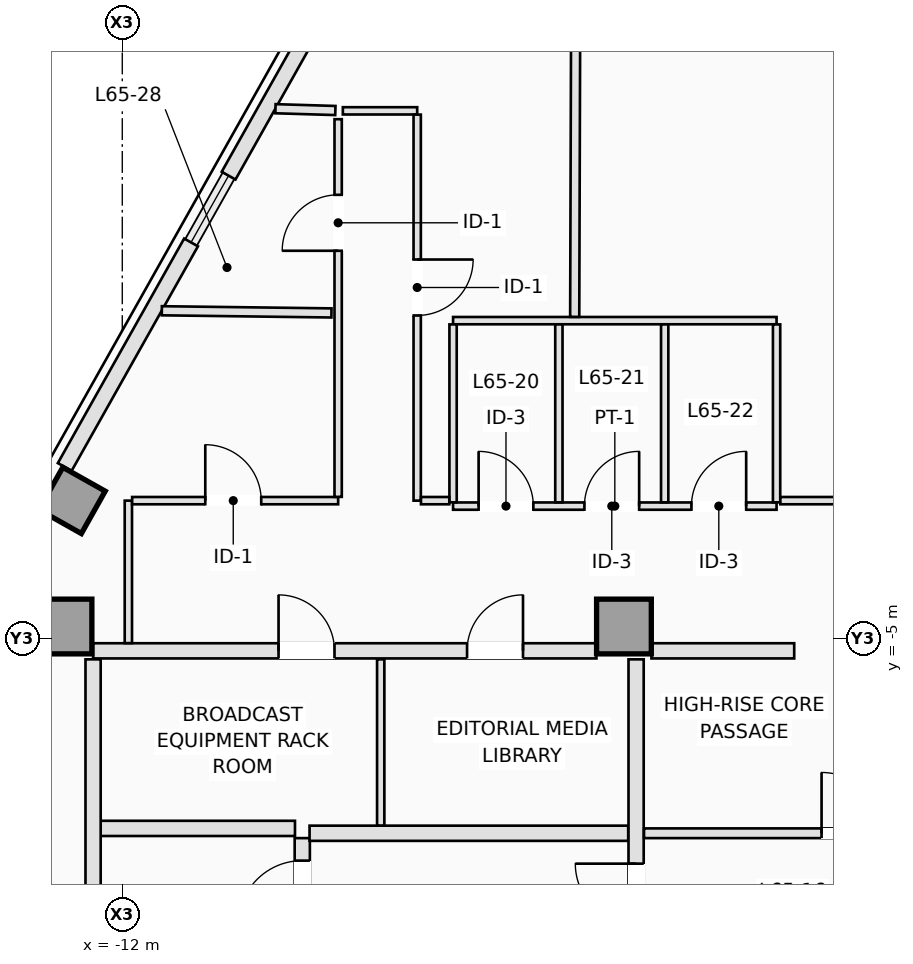
"""IFC4 building model, lengths in metres.
Left out: names, types, materials, properties, quantities, classifications, styles, units other than length and angle.
Written with IfcOpenShell. Run it as: python <this file> out.ifc"""

import sys

from ifc_helpers import new_model, si_unit, direction, frame, frame_2d, origin, origin_2d, place, context, subcontext, project, spatial, rectangle, extrude, element, fill, save


model = new_model("IFC4")
c1 = context("Model", 3, precision=1e-05, world=origin(), true_north=direction((0.0, 1.0)))
c2 = subcontext(c1, "Body", "Model", "MODEL_VIEW")
j1 = project(units=[si_unit("LENGTHUNIT", "METRE"), si_unit("PLANEANGLEUNIT", "RADIAN")], contexts=[c1])
p1 = place(None, origin())
s1 = spatial("IfcSite", under=j1, at=p1, CompositionType="ELEMENT")
p2 = place(p1, origin())
s2 = spatial("IfcBuilding", under=s1, at=p2, CompositionType="ELEMENT")
p3 = place(p2, frame((0.0, 0.0, 235.9)))
s3 = spatial("IfcBuildingStorey", under=s2, at=p3, CompositionType="ELEMENT", Elevation=235.9)
for number, where, z_axis, x_axis in (
    (1, (-12.95, -4.8, 0.0), (0.0, 0.0, 1.0), (1.0, 0.0, 0.0)),
    (2, (-3.75, -4.8, 0.0), (0.0, 0.0, 1.0), (1.0, 0.0, 0.0)),
):
    element("IfcColumn", number, at=place(p3, frame(where, z_axis=z_axis, x_axis=x_axis)), inside=s3, PredefinedType="COLUMN", context=c2, shape_type="SweptSolid", body=[
        extrude(rectangle(XDim=0.9, YDim=0.9, at=origin_2d()), origin(), (0.0, 0.0, 1.0), 3.5),
    ])
p4 = place(p3, frame((-12.825, -2.727, 0.0), z_axis=(0.0, 0.0, 1.0), x_axis=(-0.871575139605, 0.490261946333, 0.0)))
e3 = element("IfcColumn", 3, at=p4, inside=s3, PredefinedType="COLUMN", context=c2, shape_type="SweptSolid", body=[
    extrude(rectangle(XDim=0.8, YDim=0.8, at=origin_2d()), origin(), (0.0, 0.0, 1.0), 3.5),
])
p5 = place(p3, frame((-12.946, -2.177, 0.0), z_axis=(0.0, 0.0, 1.0), x_axis=(0.490244825075, 0.871584770109, 0.0)))
e4 = element("IfcWall", 4, at=p5, inside=s3, PredefinedType="STANDARD", context=c2, shape_type="SweptSolid", body=[
    extrude(rectangle(XDim=4.237, YDim=0.26, at=frame_2d((2.119, 0.0))), origin(), (0.0, 0.0, 1.0), 3.25),
])
p6 = place(p3, frame((-10.251, 2.615, 0.0), z_axis=(0.0, 0.0, 1.0), x_axis=(0.490269447258, 0.871570920284, 0.0)))
e5 = element("IfcWall", 5, at=p6, inside=s3, PredefinedType="STANDARD", context=c2, shape_type="SweptSolid", body=[
    extrude(rectangle(XDim=4.237, YDim=0.26, at=frame_2d((2.118, 0.0))), origin(), (0.0, 0.0, 1.0), 3.25),
])
p7 = place(p3, frame((-9.04, -10.18, 0.0), z_axis=(0.0, 0.0, 1.0), x_axis=(0.0, 1.0, 0.0)))
e6 = element("IfcWall", 6, at=p7, inside=s3, PredefinedType="PARTITIONING", context=c2, shape_type="SweptSolid", body=[
    extrude(rectangle(XDim=1.9, YDim=0.25, at=frame_2d((0.95, 0.0))), origin(), (0.0, 0.0, 1.0), 3.25),
])
p8 = place(p7, frame((0.48, 0.0, 0.0)))
e7 = element("IfcOpeningElement", 7, at=p8, cuts=e6, PredefinedType="OPENING", context=c2, shape_type="SweptSolid", body=[
    extrude(rectangle(XDim=1.05, YDim=2.15, at=frame_2d((0.525, 1.075))), frame((0.0, 0.135, 0.0), z_axis=(0.0, -1.0, 0.0), x_axis=(1.0, 0.0, 0.0)), (0.0, 0.0, 1.0), 0.27),
])
p9 = place(p3, frame((-12.38, -8.12, 0.0), z_axis=(0.0, 0.0, 1.0), x_axis=(1.0, 0.0, 0.0)))
e8 = element("IfcWall", 8, at=p9, inside=s3, PredefinedType="PARTITIONING", context=c2, shape_type="SweptSolid", body=[
    extrude(rectangle(XDim=3.22, YDim=0.25, at=frame_2d((1.61, 0.0))), origin(), (0.0, 0.0, 1.0), 3.25),
])
p10 = place(p3, frame((-12.48, -10.18, 0.0), z_axis=(0.0, 0.0, 1.0), x_axis=(0.0, 1.0, 0.0)))
e9 = element("IfcWall", 9, at=p10, inside=s3, PredefinedType="PARTITIONING", context=c2, shape_type="SweptSolid", body=[
    extrude(rectangle(XDim=4.84, YDim=0.25, at=frame_2d((2.42, 0.0))), origin(), (0.0, 0.0, 1.0), 3.25),
])
p11 = place(p3, frame((-8.92, -8.2, 0.0), z_axis=(0.0, 0.0, 1.0), x_axis=(1.0, 0.0, 0.0)))
e10 = element("IfcWall", 10, at=p11, inside=s3, PredefinedType="PARTITIONING", context=c2, shape_type="SweptSolid", body=[
    extrude(rectangle(XDim=5.24, YDim=0.25, at=frame_2d((2.62, 0.0))), origin(), (0.0, 0.0, 1.0), 3.25),
])
p12 = place(p3, frame((-3.55, -15.898, 0.0), z_axis=(0.0, 0.0, 1.0), x_axis=(0.0, 1.0, 0.0)))
e11 = element("IfcWall", 11, at=p12, inside=s3, PredefinedType="PARTITIONING", context=c2, shape_type="SweptSolid", body=[
    extrude(rectangle(XDim=10.558, YDim=0.25, at=frame_2d((5.279, 0.0))), origin(), (0.0, 0.0, 1.0), 3.25),
])
p13 = place(p12, frame((6.198, 0.0, 0.0)))
e12 = element("IfcOpeningElement", 12, at=p13, cuts=e11, PredefinedType="OPENING", context=c2, shape_type="SweptSolid", body=[
    extrude(rectangle(XDim=1.0, YDim=2.15, at=frame_2d((0.5, 1.075))), frame((0.0, 0.135, 0.0), z_axis=(0.0, -1.0, 0.0), x_axis=(1.0, 0.0, 0.0)), (0.0, 0.0, 1.0), 0.27),
])
p14 = place(p3, frame((-12.48, -5.2, 0.0), z_axis=(0.0, 0.0, 1.0), x_axis=(1.0, 0.0, 0.0)))
e13 = element("IfcWall", 13, at=p14, inside=s3, PredefinedType="PARTITIONING", context=c2, shape_type="SweptSolid", body=[
    extrude(rectangle(XDim=8.278, YDim=0.25, at=frame_2d((4.139, 0.0))), origin(), (0.0, 0.0, 1.0), 3.25),
])
p15 = place(p14, frame((3.05, 0.0, 0.0)))
e14 = element("IfcOpeningElement", 14, at=p15, cuts=e13, PredefinedType="OPENING", context=c2, shape_type="SweptSolid", body=[
    extrude(rectangle(XDim=0.92, YDim=2.12, at=frame_2d((0.46, 1.06))), frame((0.0, 0.135, 0.0), z_axis=(0.0, -1.0, 0.0), x_axis=(1.0, 0.0, 0.0)), (0.0, 0.0, 1.0), 0.27),
])
p16 = place(p14, frame((6.15, 0.0, 0.0)))
e15 = element("IfcOpeningElement", 15, at=p16, cuts=e13, PredefinedType="OPENING", context=c2, shape_type="SweptSolid", body=[
    extrude(rectangle(XDim=0.92, YDim=2.12, at=frame_2d((0.46, 1.06))), frame((0.0, 0.135, 0.0), z_axis=(0.0, -1.0, 0.0), x_axis=(1.0, 0.0, 0.0)), (0.0, 0.0, 1.0), 0.27),
])
p17 = place(p3, frame((-3.298, -5.2, 0.0), z_axis=(0.0, 0.0, 1.0), x_axis=(1.0, 0.0, 0.0)))
e16 = element("IfcWall", 16, at=p17, inside=s3, PredefinedType="PARTITIONING", context=c2, shape_type="SweptSolid", body=[
    extrude(rectangle(XDim=2.348, YDim=0.25, at=frame_2d((1.174, 0.0))), origin(), (0.0, 0.0, 1.0), 3.25),
])
p18 = place(p3, frame((-7.75, -8.073, 0.0), z_axis=(0.0, 0.0, 1.0), x_axis=(0.0, 1.0, 0.0)))
e17 = element("IfcWall", 17, at=p18, inside=s3, PredefinedType="PARTITIONING", context=c2, shape_type="SweptSolid", body=[
    extrude(rectangle(XDim=2.733, YDim=0.12, at=frame_2d((1.366, 0.0))), origin(), (0.0, 0.0, 1.0), 3.25),
])
p19 = place(p3, frame((-3.42, -8.2, 0.0), z_axis=(0.0, 0.0, 1.0), x_axis=(1.0, 0.0, 0.0)))
e18 = element("IfcWall", 18, at=p19, inside=s3, PredefinedType="PARTITIONING", context=c2, shape_type="SweptSolid", body=[
    extrude(rectangle(XDim=6.84, YDim=0.16, at=frame_2d((3.42, 0.0))), origin(), (0.0, 0.0, 1.0), 3.25),
])
p20 = place(p19, frame((2.92, 0.0, 0.0)))
e19 = element("IfcOpeningElement", 19, at=p20, cuts=e18, PredefinedType="OPENING", context=c2, shape_type="SweptSolid", body=[
    extrude(rectangle(XDim=1.0, YDim=2.15, at=frame_2d((0.5, 1.075))), frame((0.0, 0.09, 0.0), z_axis=(0.0, -1.0, 0.0), x_axis=(1.0, 0.0, 0.0)), (0.0, 0.0, 1.0), 0.18),
])
p21 = place(p3, frame((-6.56, -2.82, 0.0), z_axis=(0.0, 0.0, 1.0), x_axis=(1.0, 0.0, 0.0)))
e20 = element("IfcWall", 20, at=p21, inside=s3, PredefinedType="PARTITIONING", context=c2, shape_type="SweptSolid", body=[
    extrude(rectangle(XDim=5.32, YDim=0.12, at=frame_2d((2.66, 0.0))), origin(), (0.0, 0.0, 1.0), 2.943),
])
p22 = place(p21, frame((0.42, 0.0, 0.0)))
e21 = element("IfcOpeningElement", 21, at=p22, cuts=e20, PredefinedType="OPENING", context=c2, shape_type="SweptSolid", body=[
    extrude(rectangle(XDim=0.9, YDim=2.12, at=frame_2d((0.45, 1.06))), frame((0.0, 0.07, 0.0), z_axis=(0.0, -1.0, 0.0), x_axis=(1.0, 0.0, 0.0)), (0.0, 0.0, 1.0), 0.14),
])
p23 = place(p21, frame((2.16, 0.0, 0.0)))
e22 = element("IfcOpeningElement", 22, at=p23, cuts=e20, PredefinedType="OPENING", context=c2, shape_type="SweptSolid", body=[
    extrude(rectangle(XDim=0.9, YDim=2.12, at=frame_2d((0.45, 1.06))), frame((0.0, 0.07, 0.0), z_axis=(0.0, -1.0, 0.0), x_axis=(1.0, 0.0, 0.0)), (0.0, 0.0, 1.0), 0.14),
])
p24 = place(p21, frame((3.92, 0.0, 0.0)))
e23 = element("IfcOpeningElement", 23, at=p24, cuts=e20, PredefinedType="OPENING", context=c2, shape_type="SweptSolid", body=[
    extrude(rectangle(XDim=0.9, YDim=2.12, at=frame_2d((0.45, 1.06))), frame((0.0, 0.07, 0.0), z_axis=(0.0, -1.0, 0.0), x_axis=(1.0, 0.0, 0.0)), (0.0, 0.0, 1.0), 0.14),
])
p25 = place(p3, frame((-6.56, 0.23, 0.0), z_axis=(0.0, 0.0, 1.0), x_axis=(1.0, 0.0, 0.0)))
e24 = element("IfcWall", 24, at=p25, inside=s3, PredefinedType="PARTITIONING", context=c2, shape_type="SweptSolid", body=[
    extrude(rectangle(XDim=5.32, YDim=0.12, at=frame_2d((2.66, 0.0))), origin(), (0.0, 0.0, 1.0), 3.25),
])
for number, where, z_axis, x_axis in (
    (25, (-6.56, -2.758, 0.0), (0.0, 0.0, 1.0), (0.0, 1.0, 0.0)),
    (26, (-4.82, -2.758, 0.0), (0.0, 0.0, 1.0), (0.0, 1.0, 0.0)),
    (27, (-3.08, -2.758, 0.0), (0.0, 0.0, 1.0), (0.0, 1.0, 0.0)),
    (28, (-1.24, -2.758, 0.0), (0.0, 0.0, 1.0), (0.0, 1.0, 0.0)),
):
    element("IfcWall", number, at=place(p3, frame(where, z_axis=z_axis, x_axis=x_axis)), inside=s3, PredefinedType="PARTITIONING", context=c2, shape_type="SweptSolid", body=[
        extrude(rectangle(XDim=2.926, YDim=0.12, at=frame_2d((1.463, 0.0))), origin(), (0.0, 0.0, 1.0), 3.25),
    ])
p26 = place(p3, frame((-11.9, -5.073, 0.0), z_axis=(0.0, 0.0, 1.0), x_axis=(0.0, 1.0, 0.0)))
e29 = element("IfcWall", 29, at=p26, inside=s3, PredefinedType="PARTITIONING", context=c2, shape_type="SweptSolid", body=[
    extrude(rectangle(XDim=2.343, YDim=0.12, at=frame_2d((1.171, 0.0))), origin(), (0.0, 0.0, 1.0), 3.25),
])
p27 = place(p3, frame((-11.838, -2.73, 0.0), z_axis=(0.0, 0.0, 1.0), x_axis=(1.0, 0.0, 0.0)))
e30 = element("IfcWall", 30, at=p27, inside=s3, PredefinedType="PARTITIONING", context=c2, shape_type="SweptSolid", body=[
    extrude(rectangle(XDim=3.388, YDim=0.12, at=frame_2d((1.694, 0.0))), origin(), (0.0, 0.0, 1.0), 3.25),
])
p28 = place(p27, frame((1.203, 0.0, 0.0)))
e31 = element("IfcOpeningElement", 31, at=p28, cuts=e30, PredefinedType="OPENING", context=c2, shape_type="SweptSolid", body=[
    extrude(rectangle(XDim=0.92, YDim=2.12, at=frame_2d((0.46, 1.06))), frame((0.0, 0.07, 0.0), z_axis=(0.0, -1.0, 0.0), x_axis=(1.0, 0.0, 0.0)), (0.0, 0.0, 1.0), 0.14),
])
p29 = place(p3, frame((-8.45, -2.668, 0.0), z_axis=(0.0, 0.0, 1.0), x_axis=(0.0, 1.0, 0.0)))
e32 = element("IfcWall", 32, at=p29, inside=s3, PredefinedType="PARTITIONING", context=c2, shape_type="SweptSolid", body=[
    extrude(rectangle(XDim=6.21, YDim=0.12, at=frame_2d((3.105, 0.0))), origin(), (0.0, 0.0, 1.0), 3.25),
])
p30 = place(p29, frame((4.047, 0.0, 0.0)))
e33 = element("IfcOpeningElement", 33, at=p30, cuts=e32, PredefinedType="OPENING", context=c2, shape_type="SweptSolid", body=[
    extrude(rectangle(XDim=0.92, YDim=2.12, at=frame_2d((0.46, 1.06))), frame((0.0, 0.07, 0.0), z_axis=(0.0, -1.0, 0.0), x_axis=(1.0, 0.0, 0.0)), (0.0, 0.0, 1.0), 0.14),
])
p31 = place(p3, frame((-8.373, 3.68, 0.0), z_axis=(0.0, 0.0, 1.0), x_axis=(1.0, 0.0, 0.0)))
e34 = element("IfcWall", 34, at=p31, inside=s3, PredefinedType="PARTITIONING", context=c2, shape_type="SweptSolid", body=[
    extrude(rectangle(XDim=1.223, YDim=0.12, at=frame_2d((0.611, 0.0))), origin(), (0.0, 0.0, 1.0), 3.25),
])
p32 = place(p3, frame((-7.15, 3.618, 0.0), z_axis=(0.0, 0.0, 1.0), x_axis=(0.0, -1.0, 0.0)))
e35 = element("IfcWall", 35, at=p32, inside=s3, PredefinedType="PARTITIONING", context=c2, shape_type="SweptSolid", body=[
    extrude(rectangle(XDim=6.348, YDim=0.12, at=frame_2d((3.174, 0.0))), origin(), (0.0, 0.0, 1.0), 3.25),
])
p33 = place(p32, frame((2.383, 0.0, 0.0)))
e36 = element("IfcOpeningElement", 36, at=p33, cuts=e35, PredefinedType="OPENING", context=c2, shape_type="SweptSolid", body=[
    extrude(rectangle(XDim=0.92, YDim=2.12, at=frame_2d((0.46, 1.06))), frame((0.0, 0.07, 0.0), z_axis=(0.0, -1.0, 0.0), x_axis=(1.0, 0.0, 0.0)), (0.0, 0.0, 1.0), 0.14),
])
p34 = place(p3, frame((-7.088, -2.73, 0.0), z_axis=(0.0, 0.0, 1.0), x_axis=(1.0, 0.0, 0.0)))
e37 = element("IfcWall", 37, at=p34, inside=s3, PredefinedType="PARTITIONING", context=c2, shape_type="SweptSolid", body=[
    extrude(rectangle(XDim=0.466, YDim=0.12, at=frame_2d((0.233, 0.0))), origin(), (0.0, 0.0, 1.0), 3.25),
])
p35 = place(p3, frame((-1.178, -2.73, 0.0), z_axis=(0.0, 0.0, 1.0), x_axis=(1.0, 0.0, 0.0)))
e38 = element("IfcWall", 38, at=p35, inside=s3, PredefinedType="PARTITIONING", context=c2, shape_type="SweptSolid", body=[
    extrude(rectangle(XDim=8.428, YDim=0.12, at=frame_2d((4.214, 0.0))), origin(), (0.0, 0.0, 1.0), 2.943),
])
p36 = place(p35, frame((1.08, 0.0, 0.0)))
e39 = element("IfcOpeningElement", 39, at=p36, cuts=e38, PredefinedType="OPENING", context=c2, shape_type="SweptSolid", body=[
    extrude(rectangle(XDim=0.92, YDim=2.12, at=frame_2d((0.46, 1.06))), frame((0.0, 0.07, 0.0), z_axis=(0.0, -1.0, 0.0), x_axis=(1.0, 0.0, 0.0)), (0.0, 0.0, 1.0), 0.14),
])
p37 = place(p35, frame((3.755, 0.0, 0.0)))
e40 = element("IfcOpeningElement", 40, at=p37, cuts=e38, PredefinedType="OPENING", context=c2, shape_type="SweptSolid", body=[
    extrude(rectangle(XDim=0.92, YDim=2.12, at=frame_2d((0.46, 1.06))), frame((0.0, 0.07, 0.0), z_axis=(0.0, -1.0, 0.0), x_axis=(1.0, 0.0, 0.0)), (0.0, 0.0, 1.0), 0.14),
])
p38 = place(p3, frame((-4.56, 0.292, 0.0), z_axis=(0.0, 0.0, 1.0), x_axis=(0.003171231411, 0.999994971633, 0.0)))
e41 = element("IfcWall", 41, at=p38, inside=s3, PredefinedType="PARTITIONING", context=c2, shape_type="SweptSolid", body=[
    extrude(rectangle(XDim=12.241, YDim=0.15, at=frame_2d((6.12, 0.0))), origin(), (0.0, 0.0, 1.0), 3.25),
])
p39 = place(p3, frame((-8.496, 3.685, 0.0), z_axis=(0.0, 0.0, 1.0), x_axis=(-0.99954299591, 0.030229113907, 0.0)))
e42 = element("IfcWall", 42, at=p39, inside=s3, PredefinedType="PARTITIONING", context=c2, shape_type="SweptSolid", body=[
    extrude(rectangle(XDim=0.985, YDim=0.15, at=frame_2d((0.493, 0.0))), origin(), (0.0, 0.0, 1.0), 3.25),
])
p40 = place(p3, frame((-8.56, 0.357, 0.0), z_axis=(0.0, 0.0, 1.0), x_axis=(-0.999917251082, 0.012864330116, 0.0)))
e43 = element("IfcWall", 43, at=p40, inside=s3, PredefinedType="PARTITIONING", context=c2, shape_type="SweptSolid", body=[
    extrude(rectangle(XDim=2.79, YDim=0.15, at=frame_2d((1.395, 0.0))), origin(), (0.0, 0.0, 1.0), 3.25),
])
p41 = place(p8, origin())
e44 = element("IfcDoor", 44, at=p41, inside=s3, OperationType="SINGLE_SWING_LEFT", PredefinedType="DOOR", context=c2, shape_type="SweptSolid", body=[
    extrude(rectangle(XDim=1.05, YDim=2.15, at=frame_2d((0.525, 1.075))), frame((0.0, 0.025, 0.0), z_axis=(0.0, -1.0, 0.0), x_axis=(1.0, 0.0, 0.0)), (0.0, 0.0, 1.0), 0.05),
])
fill(e7, e44)
p42 = place(p13, origin())
e45 = element("IfcDoor", 45, at=p42, inside=s3, OperationType="SINGLE_SWING_RIGHT", PredefinedType="DOOR", context=c2, shape_type="SweptSolid", body=[
    extrude(rectangle(XDim=1.0, YDim=2.15, at=frame_2d((0.5, 1.075))), frame((0.0, 0.025, 0.0), z_axis=(0.0, -1.0, 0.0), x_axis=(1.0, 0.0, 0.0)), (0.0, 0.0, 1.0), 0.05),
])
fill(e12, e45)
p43 = place(p15, origin())
e46 = element("IfcDoor", 46, at=p43, inside=s3, OperationType="SINGLE_SWING_LEFT", PredefinedType="DOOR", context=c2, shape_type="SweptSolid", body=[
    extrude(rectangle(XDim=0.92, YDim=2.12, at=frame_2d((0.46, 1.06))), frame((0.0, 0.025, 0.0), z_axis=(0.0, -1.0, 0.0), x_axis=(1.0, 0.0, 0.0)), (0.0, 0.0, 1.0), 0.05),
])
fill(e14, e46)
p44 = place(p16, origin())
e47 = element("IfcDoor", 47, at=p44, inside=s3, OperationType="SINGLE_SWING_RIGHT", PredefinedType="DOOR", context=c2, shape_type="SweptSolid", body=[
    extrude(rectangle(XDim=0.92, YDim=2.12, at=frame_2d((0.46, 1.06))), frame((0.0, 0.025, 0.0), z_axis=(0.0, -1.0, 0.0), x_axis=(1.0, 0.0, 0.0)), (0.0, 0.0, 1.0), 0.05),
])
fill(e15, e47)
p45 = place(p20, origin())
e48 = element("IfcDoor", 48, at=p45, inside=s3, OperationType="SINGLE_SWING_LEFT", PredefinedType="DOOR", context=c2, shape_type="SweptSolid", body=[
    extrude(rectangle(XDim=1.0, YDim=2.15, at=frame_2d((0.5, 1.075))), frame((0.0, 0.025, 0.0), z_axis=(0.0, -1.0, 0.0), x_axis=(1.0, 0.0, 0.0)), (0.0, 0.0, 1.0), 0.05),
])
fill(e19, e48)
p46 = place(p22, origin())
e49 = element("IfcDoor", 49, at=p46, inside=s3, OperationType="SINGLE_SWING_LEFT", PredefinedType="DOOR", context=c2, shape_type="SweptSolid", body=[
    extrude(rectangle(XDim=0.9, YDim=2.12, at=frame_2d((0.45, 1.06))), frame((0.0, 0.025, 0.0), z_axis=(0.0, -1.0, 0.0), x_axis=(1.0, 0.0, 0.0)), (0.0, 0.0, 1.0), 0.05),
])
fill(e21, e49)
p47 = place(p23, origin())
e50 = element("IfcDoor", 50, at=p47, inside=s3, OperationType="SINGLE_SWING_RIGHT", PredefinedType="DOOR", context=c2, shape_type="SweptSolid", body=[
    extrude(rectangle(XDim=0.9, YDim=2.12, at=frame_2d((0.45, 1.06))), frame((0.0, 0.025, 0.0), z_axis=(0.0, -1.0, 0.0), x_axis=(1.0, 0.0, 0.0)), (0.0, 0.0, 1.0), 0.05),
])
fill(e22, e50)
p48 = place(p24, origin())
e51 = element("IfcDoor", 51, at=p48, inside=s3, OperationType="SINGLE_SWING_RIGHT", PredefinedType="DOOR", context=c2, shape_type="SweptSolid", body=[
    extrude(rectangle(XDim=0.9, YDim=2.12, at=frame_2d((0.45, 1.06))), frame((0.0, 0.025, 0.0), z_axis=(0.0, -1.0, 0.0), x_axis=(1.0, 0.0, 0.0)), (0.0, 0.0, 1.0), 0.05),
])
fill(e23, e51)
p49 = place(p33, origin())
e52 = element("IfcDoor", 52, at=p49, inside=s3, OperationType="SINGLE_SWING_LEFT", PredefinedType="DOOR", context=c2, shape_type="SweptSolid", body=[
    extrude(rectangle(XDim=0.92, YDim=2.12, at=frame_2d((0.46, 1.06))), frame((0.0, 0.025, 0.0), z_axis=(0.0, -1.0, 0.0), x_axis=(1.0, 0.0, 0.0)), (0.0, 0.0, 1.0), 0.05),
])
fill(e36, e52)
p50 = place(p30, origin())
e53 = element("IfcDoor", 53, at=p50, inside=s3, OperationType="SINGLE_SWING_LEFT", PredefinedType="DOOR", context=c2, shape_type="SweptSolid", body=[
    extrude(rectangle(XDim=0.92, YDim=2.12, at=frame_2d((0.46, 1.06))), frame((0.0, 0.025, 0.0), z_axis=(0.0, -1.0, 0.0), x_axis=(1.0, 0.0, 0.0)), (0.0, 0.0, 1.0), 0.05),
])
fill(e33, e53)
p51 = place(p28, origin())
e54 = element("IfcDoor", 54, at=p51, inside=s3, OperationType="SINGLE_SWING_LEFT", PredefinedType="DOOR", context=c2, shape_type="SweptSolid", body=[
    extrude(rectangle(XDim=0.92, YDim=2.12, at=frame_2d((0.46, 1.06))), frame((0.0, 0.025, 0.0), z_axis=(0.0, -1.0, 0.0), x_axis=(1.0, 0.0, 0.0)), (0.0, 0.0, 1.0), 0.05),
])
fill(e31, e54)
save(model, sys.argv[1])
